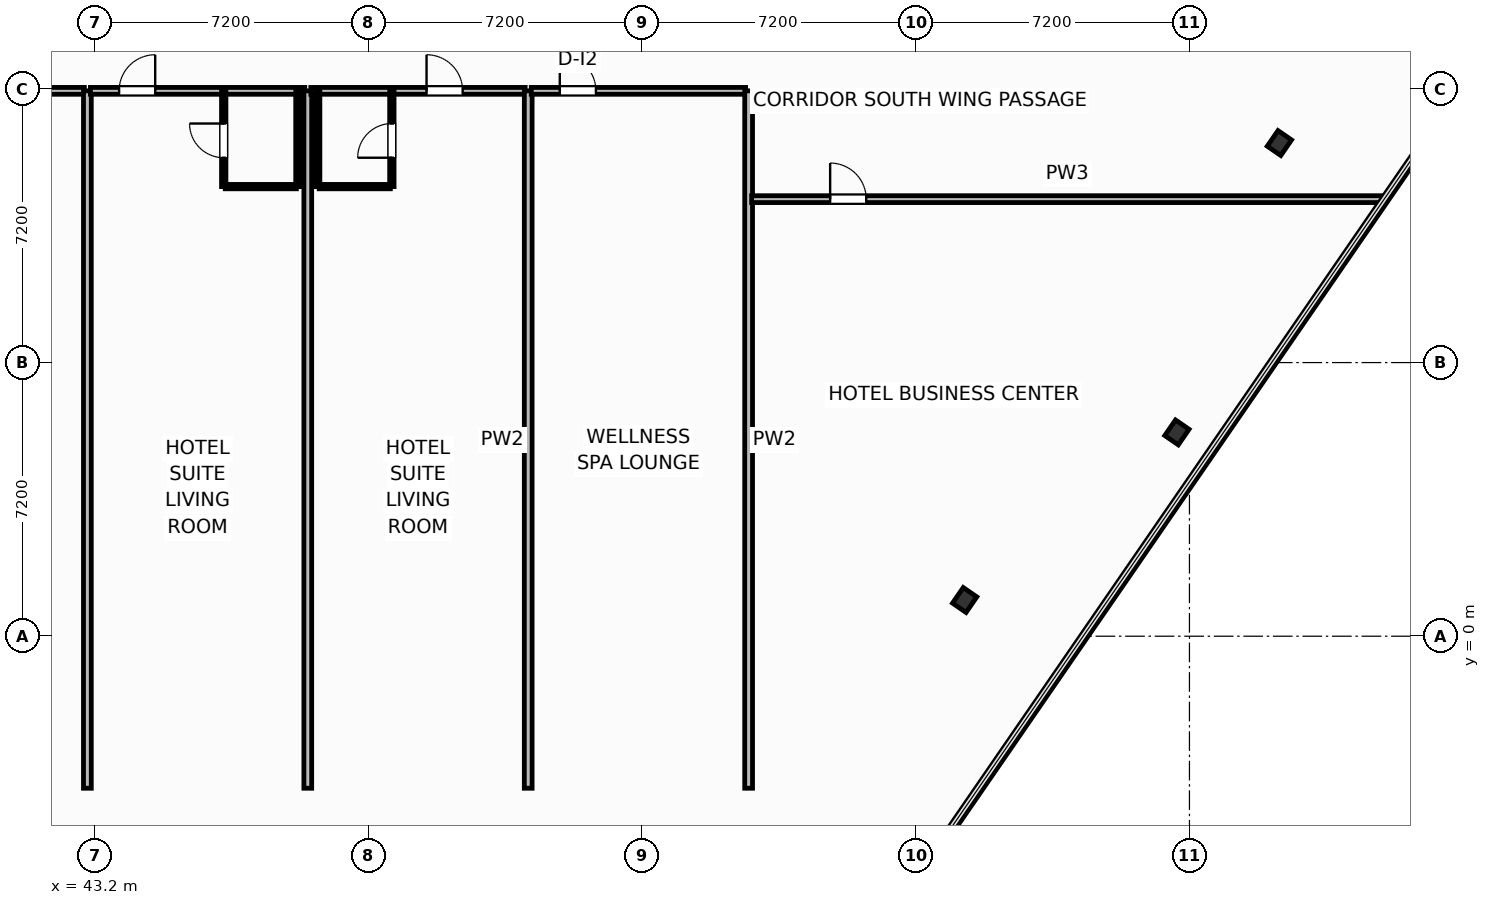
"""IFC4 building model, lengths in metres.
Left out: names, types, materials, properties, quantities, classifications, styles, units other than length and angle.
Written with IfcOpenShell. Run it as: python <this file> out.ifc"""

import sys

from ifc_helpers import new_model, si_unit, direction, frame, frame_2d, origin, origin_2d, place, context, subcontext, project, spatial, rectangle, i_section, extrude, element, fill, save


model = new_model("IFC4")
c1 = context("Model", 3, precision=1e-05, world=origin(), true_north=direction((0.0, 1.0)))
c2 = subcontext(c1, "Body", "Model", "MODEL_VIEW")
j1 = project(units=[si_unit("LENGTHUNIT", "METRE"), si_unit("PLANEANGLEUNIT", "RADIAN")], contexts=[c1])
p1 = place(None, origin())
s1 = spatial("IfcSite", under=j1, at=p1, CompositionType="ELEMENT")
p2 = place(p1, origin())
s2 = spatial("IfcBuilding", under=s1, at=p2, CompositionType="ELEMENT")
p3 = place(p2, frame((0.0, 0.0, 67.7)))
s3 = spatial("IfcBuildingStorey", under=s2, at=p3, CompositionType="ELEMENT", Elevation=67.7)
for number, where, z_axis, x_axis in (
    (1, (66.085, 0.953, 0.0), (0.0, 0.0, 1.0), (0.824, -0.567, 0.0)),
    (2, (71.67, 5.363, 0.0), (0.0, 0.0, 1.0), (0.824, -0.567, 0.0)),
    (3, (74.367, 12.976, 0.0), (0.0, 0.0, 1.0), (0.824, -0.567, 0.0)),
):
    element("IfcColumn", number, at=place(p3, frame(where, z_axis=z_axis, x_axis=x_axis)), inside=s3, PredefinedType="COLUMN", context=c2, shape_type="SweptSolid", body=[
        extrude(i_section(OverallWidth=0.432, OverallDepth=0.498, WebThickness=0.056, FlangeThickness=0.089, FilletRadius=0.025, at=origin_2d()), origin(), (0.0, 0.0, 1.0), 3.7),
    ])
p4 = place(p3, frame((33.518, -1.362, 0.0), z_axis=(0.0, 0.0, 1.0), x_axis=(0.82353935489, -0.567259139148, 0.0)))
e4 = element("IfcWall", 4, at=p4, inside=s3, PredefinedType="SOLIDWALL", context=c2, shape_type="SweptSolid", body=[
    extrude(rectangle(XDim=23.147, YDim=0.22, at=frame_2d((11.573, 0.0))), origin(), (0.0, 0.0, 1.0), 2.66),
])
p5 = place(p4, frame((10.749, 0.0, 0.8)))
e5 = element("IfcOpeningElement", 5, at=p5, cuts=e4, PredefinedType="OPENING", context=c2, shape_type="SweptSolid", body=[
    extrude(rectangle(XDim=1.65, YDim=1.65, at=frame_2d((0.825, 0.825))), frame((0.0, 0.12, 0.0), z_axis=(0.0, -1.0, 0.0), x_axis=(1.0, 0.0, 0.0)), (0.0, 0.0, 1.0), 0.24),
])
p6 = place(p3, frame((37.28, 14.35, 0.0), z_axis=(0.0, 0.0, 1.0), x_axis=(1.0, 0.0, 0.0)))
e6 = element("IfcWall", 6, at=p6, inside=s3, PredefinedType="PARTITIONING", context=c2, shape_type="SweptSolid", body=[
    extrude(rectangle(XDim=5.64, YDim=0.18, at=frame_2d((2.82, 0.0))), origin(), (0.0, 0.0, 1.0), 3.38),
])
p7 = place(p6, frame((3.045, 0.0, 0.0)))
e7 = element("IfcOpeningElement", 7, at=p7, cuts=e6, PredefinedType="OPENING", context=c2, shape_type="SweptSolid", body=[
    extrude(rectangle(XDim=0.95, YDim=2.15, at=frame_2d((0.475, 1.075))), frame((0.0, 0.1, 0.0), z_axis=(0.0, -1.0, 0.0), x_axis=(1.0, 0.0, 0.0)), (0.0, 0.0, 1.0), 0.2),
])
p8 = place(p3, frame((43.0, -4.0, 0.0), z_axis=(0.0, 0.0, 1.0), x_axis=(0.0, 1.0, 0.0)))
e8 = element("IfcWall", 8, at=p8, inside=s3, PredefinedType="PARTITIONING", context=c2, shape_type="SweptSolid", body=[
    extrude(rectangle(XDim=18.35, YDim=0.205, at=frame_2d((9.175, 0.0))), origin(), (0.0, 0.0, 1.0), 1.165),
])
p9 = place(p3, frame((43.08, 14.35, 0.0), z_axis=(0.0, 0.0, 1.0), x_axis=(1.0, 0.0, 0.0)))
e9 = element("IfcWall", 9, at=p9, inside=s3, PredefinedType="PARTITIONING", context=c2, shape_type="SweptSolid", body=[
    extrude(rectangle(XDim=5.64, YDim=0.18, at=frame_2d((2.82, 0.0))), origin(), (0.0, 0.0, 1.0), 3.38),
])
p10 = place(p9, frame((0.754, 0.0, 0.0)))
e10 = element("IfcOpeningElement", 10, at=p10, cuts=e9, PredefinedType="OPENING", context=c2, shape_type="SweptSolid", body=[
    extrude(rectangle(XDim=0.95, YDim=2.15, at=frame_2d((0.475, 1.075))), frame((0.0, 0.1, 0.0), z_axis=(0.0, -1.0, 0.0), x_axis=(1.0, 0.0, 0.0)), (0.0, 0.0, 1.0), 0.2),
])
p11 = place(p3, frame((46.628, 11.83, 0.0), z_axis=(0.0, 0.0, 1.0), x_axis=(1.0, 0.0, 0.0)))
e11 = element("IfcWall", 11, at=p11, inside=s3, PredefinedType="PARTITIONING", context=c2, shape_type="SweptSolid", body=[
    extrude(rectangle(XDim=1.872, YDim=0.115, at=frame_2d((0.936, 0.0))), origin(), (0.0, 0.0, 1.0), 3.38),
])
p12 = place(p3, frame((46.588, 11.83, 0.0), z_axis=(0.0, 0.0, 1.0), x_axis=(0.0, 1.0, 0.0)))
e12 = element("IfcWall", 12, at=p12, inside=s3, PredefinedType="PARTITIONING", context=c2, shape_type="SweptSolid", body=[
    extrude(rectangle(XDim=2.52, YDim=0.115, at=frame_2d((1.26, 0.0))), origin(), (0.0, 0.0, 1.0), 3.38),
])
p13 = place(p12, frame((0.76, 0.0, 0.0)))
e13 = element("IfcOpeningElement", 13, at=p13, cuts=e12, PredefinedType="OPENING", context=c2, shape_type="SweptSolid", body=[
    extrude(rectangle(XDim=0.9, YDim=2.05, at=frame_2d((0.45, 1.025))), frame((0.0, 0.067, 0.0), z_axis=(0.0, -1.0, 0.0), x_axis=(1.0, 0.0, 0.0)), (0.0, 0.0, 1.0), 0.135),
])
p14 = place(p3, frame((48.54, 11.83, 0.0), z_axis=(0.0, 0.0, 1.0), x_axis=(0.0, 1.0, 0.0)))
e14 = element("IfcWall", 14, at=p14, inside=s3, PredefinedType="PARTITIONING", context=c2, shape_type="SweptSolid", body=[
    extrude(rectangle(XDim=2.52, YDim=0.115, at=frame_2d((1.26, 0.0))), origin(), (0.0, 0.0, 1.0), 3.38),
])
p15 = place(p3, frame((48.8, -4.0, 0.0), z_axis=(0.0, 0.0, 1.0), x_axis=(0.0, 1.0, 0.0)))
e15 = element("IfcWall", 15, at=p15, inside=s3, PredefinedType="PARTITIONING", context=c2, shape_type="SweptSolid", body=[
    extrude(rectangle(XDim=18.35, YDim=0.205, at=frame_2d((9.175, 0.0))), origin(), (0.0, 0.0, 1.0), 3.38),
])
p16 = place(p3, frame((48.88, 14.35, 0.0), z_axis=(0.0, 0.0, 1.0), x_axis=(1.0, 0.0, 0.0)))
e16 = element("IfcWall", 16, at=p16, inside=s3, PredefinedType="PARTITIONING", context=c2, shape_type="SweptSolid", body=[
    extrude(rectangle(XDim=5.64, YDim=0.18, at=frame_2d((2.82, 0.0))), origin(), (0.0, 0.0, 1.0), 3.38),
])
p17 = place(p16, frame((3.045, 0.0, 0.0)))
e17 = element("IfcOpeningElement", 17, at=p17, cuts=e16, PredefinedType="OPENING", context=c2, shape_type="SweptSolid", body=[
    extrude(rectangle(XDim=0.95, YDim=2.15, at=frame_2d((0.475, 1.075))), frame((0.0, 0.1, 0.0), z_axis=(0.0, -1.0, 0.0), x_axis=(1.0, 0.0, 0.0)), (0.0, 0.0, 1.0), 0.2),
])
p18 = place(p3, frame((49.1, 11.83, 0.0), z_axis=(0.0, 0.0, 1.0), x_axis=(1.0, 0.0, 0.0)))
e18 = element("IfcWall", 18, at=p18, inside=s3, PredefinedType="PARTITIONING", context=c2, shape_type="SweptSolid", body=[
    extrude(rectangle(XDim=1.872, YDim=0.115, at=frame_2d((0.936, 0.0))), origin(), (0.0, 0.0, 1.0), 3.38),
])
p19 = place(p3, frame((51.012, 11.83, 0.0), z_axis=(0.0, 0.0, 1.0), x_axis=(0.0, 1.0, 0.0)))
e19 = element("IfcWall", 19, at=p19, inside=s3, PredefinedType="PARTITIONING", context=c2, shape_type="SweptSolid", body=[
    extrude(rectangle(XDim=2.52, YDim=0.115, at=frame_2d((1.26, 0.0))), origin(), (0.0, 0.0, 1.0), 3.38),
])
p20 = place(p19, frame((0.76, 0.0, 0.0)))
e20 = element("IfcOpeningElement", 20, at=p20, cuts=e19, PredefinedType="OPENING", context=c2, shape_type="SweptSolid", body=[
    extrude(rectangle(XDim=0.9, YDim=2.05, at=frame_2d((0.45, 1.025))), frame((0.0, 0.067, 0.0), z_axis=(0.0, -1.0, 0.0), x_axis=(1.0, 0.0, 0.0)), (0.0, 0.0, 1.0), 0.135),
])
p21 = place(p3, frame((49.06, 11.83, 0.0), z_axis=(0.0, 0.0, 1.0), x_axis=(0.0, 1.0, 0.0)))
e21 = element("IfcWall", 21, at=p21, inside=s3, PredefinedType="PARTITIONING", context=c2, shape_type="SweptSolid", body=[
    extrude(rectangle(XDim=2.52, YDim=0.115, at=frame_2d((1.26, 0.0))), origin(), (0.0, 0.0, 1.0), 3.38),
])
p22 = place(p3, frame((54.6, -4.0, 0.0), z_axis=(0.0, 0.0, 1.0), x_axis=(0.0, 1.0, 0.0)))
e22 = element("IfcWall", 22, at=p22, inside=s3, PredefinedType="PARTITIONING", context=c2, shape_type="SweptSolid", body=[
    extrude(rectangle(XDim=18.35, YDim=0.205, at=frame_2d((9.175, 0.0))), origin(), (0.0, 0.0, 1.0), 3.38),
])
p23 = place(p3, frame((54.68, 14.35, 0.0), z_axis=(0.0, 0.0, 1.0), x_axis=(1.0, 0.0, 0.0)))
e23 = element("IfcWall", 23, at=p23, inside=s3, PredefinedType="PARTITIONING", context=c2, shape_type="SweptSolid", body=[
    extrude(rectangle(XDim=5.64, YDim=0.18, at=frame_2d((2.82, 0.0))), origin(), (0.0, 0.0, 1.0), 3.38),
])
p24 = place(p23, frame((0.751, 0.0, 0.0)))
e24 = element("IfcOpeningElement", 24, at=p24, cuts=e23, PredefinedType="OPENING", context=c2, shape_type="SweptSolid", body=[
    extrude(rectangle(XDim=0.95, YDim=2.05, at=frame_2d((0.475, 1.025))), frame((0.0, 0.1, 0.0), z_axis=(0.0, -1.0, 0.0), x_axis=(1.0, 0.0, 0.0)), (0.0, 0.0, 1.0), 0.2),
])
p25 = place(p3, frame((60.4, -4.0, 0.0), z_axis=(0.0, 0.0, 1.0), x_axis=(0.0, 1.0, 0.0)))
e25 = element("IfcWall", 25, at=p25, inside=s3, PredefinedType="PARTITIONING", context=c2, shape_type="SweptSolid", body=[
    extrude(rectangle(XDim=18.35, YDim=0.205, at=frame_2d((9.175, 0.0))), origin(), (0.0, 0.0, 1.0), 3.38),
])
p26 = place(p3, frame((60.48, 11.5, 0.0), z_axis=(0.0, 0.0, 1.0), x_axis=(1.0, 0.0, 0.0)))
e26 = element("IfcWall", 26, at=p26, inside=s3, PredefinedType="PARTITIONING", context=c2, shape_type="SweptSolid", body=[
    extrude(rectangle(XDim=16.604, YDim=0.18, at=frame_2d((8.302, 0.0))), origin(), (0.0, 0.0, 1.0), 3.38),
])
p27 = place(p26, frame((2.065, 0.0, 0.0)))
e27 = element("IfcOpeningElement", 27, at=p27, cuts=e26, PredefinedType="OPENING", context=c2, shape_type="SweptSolid", body=[
    extrude(rectangle(XDim=0.95, YDim=2.05, at=frame_2d((0.475, 1.025))), frame((0.0, 0.1, 0.0), z_axis=(0.0, -1.0, 0.0), x_axis=(1.0, 0.0, 0.0)), (0.0, 0.0, 1.0), 0.2),
])
p28 = place(p10, origin())
e28 = element("IfcDoor", 28, at=p28, inside=s3, OperationType="SINGLE_SWING_RIGHT", PredefinedType="DOOR", context=c2, shape_type="SweptSolid", body=[
    extrude(rectangle(XDim=0.95, YDim=2.15, at=frame_2d((0.475, 1.075))), frame((0.0, 0.025, 0.0), z_axis=(0.0, -1.0, 0.0), x_axis=(1.0, 0.0, 0.0)), (0.0, 0.0, 1.0), 0.05),
])
fill(e10, e28)
p29 = place(p13, origin())
e29 = element("IfcDoor", 29, at=p29, inside=s3, OperationType="SINGLE_SWING_RIGHT", PredefinedType="DOOR", context=c2, shape_type="SweptSolid", body=[
    extrude(rectangle(XDim=0.9, YDim=2.05, at=frame_2d((0.45, 1.025))), frame((0.0, 0.025, 0.0), z_axis=(0.0, -1.0, 0.0), x_axis=(1.0, 0.0, 0.0)), (0.0, 0.0, 1.0), 0.05),
])
fill(e13, e29)
p30 = place(p17, origin())
e30 = element("IfcDoor", 30, at=p30, inside=s3, OperationType="SINGLE_SWING_LEFT", PredefinedType="DOOR", context=c2, shape_type="SweptSolid", body=[
    extrude(rectangle(XDim=0.95, YDim=2.15, at=frame_2d((0.475, 1.075))), frame((0.0, 0.025, 0.0), z_axis=(0.0, -1.0, 0.0), x_axis=(1.0, 0.0, 0.0)), (0.0, 0.0, 1.0), 0.05),
])
fill(e17, e30)
p31 = place(p20, origin())
e31 = element("IfcDoor", 31, at=p31, inside=s3, OperationType="SINGLE_SWING_LEFT", PredefinedType="DOOR", context=c2, shape_type="SweptSolid", body=[
    extrude(rectangle(XDim=0.9, YDim=2.05, at=frame_2d((0.45, 1.025))), frame((0.0, 0.025, 0.0), z_axis=(0.0, -1.0, 0.0), x_axis=(1.0, 0.0, 0.0)), (0.0, 0.0, 1.0), 0.05),
])
fill(e20, e31)
p32 = place(p24, origin())
e32 = element("IfcDoor", 32, at=p32, inside=s3, OperationType="SINGLE_SWING_LEFT", PredefinedType="DOOR", context=c2, shape_type="SweptSolid", body=[
    extrude(rectangle(XDim=0.95, YDim=2.05, at=frame_2d((0.475, 1.025))), frame((0.0, 0.025, 0.0), z_axis=(0.0, -1.0, 0.0), x_axis=(1.0, 0.0, 0.0)), (0.0, 0.0, 1.0), 0.05),
])
fill(e24, e32)
p33 = place(p27, origin())
e33 = element("IfcDoor", 33, at=p33, inside=s3, OperationType="SINGLE_SWING_LEFT", PredefinedType="DOOR", context=c2, shape_type="SweptSolid", body=[
    extrude(rectangle(XDim=0.95, YDim=2.05, at=frame_2d((0.475, 1.025))), frame((0.0, 0.025, 0.0), z_axis=(0.0, -1.0, 0.0), x_axis=(1.0, 0.0, 0.0)), (0.0, 0.0, 1.0), 0.05),
])
fill(e27, e33)
save(model, sys.argv[1])
